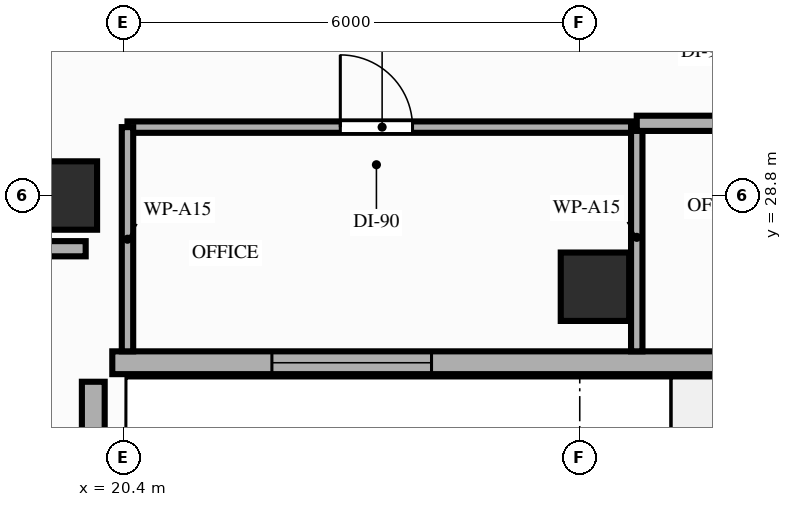
"""IFC4 building model, lengths in metres.
Left out: names, types, materials, properties, quantities, classifications, styles, units other than length and angle.
Written with IfcOpenShell. Run it as: python <this file> out.ifc"""

import sys

from ifc_helpers import new_model, si_unit, direction, frame, frame_2d, origin, origin_2d, place, context, subcontext, project, spatial, rectangle, extrude, element, fill, save


model = new_model("IFC4")
c1 = context("Model", 3, precision=1e-05, world=origin(), true_north=direction((0.0, 1.0)))
c2 = subcontext(c1, "Body", "Model", "MODEL_VIEW")
j1 = project(units=[si_unit("LENGTHUNIT", "METRE"), si_unit("PLANEANGLEUNIT", "RADIAN")], contexts=[c1])
p1 = place(None, origin())
s1 = spatial("IfcSite", under=j1, at=p1, CompositionType="ELEMENT")
p2 = place(p1, origin())
s2 = spatial("IfcBuilding", under=s1, at=p2, CompositionType="ELEMENT")
p3 = place(p2, frame((0.0, 0.0, 185.6)))
s3 = spatial("IfcBuildingStorey", under=s2, at=p3, CompositionType="ELEMENT", Elevation=185.6)
for number, where, z_axis, x_axis in (
    (1, (19.6, 28.8, 0.0), (0.0, 0.0, 1.0), (1.0, 0.0, 0.0)),
    (2, (26.6, 27.6, 0.0), (0.0, 0.0, 1.0), (1.0, 0.0, 0.0)),
):
    element("IfcColumn", number, at=place(p3, frame(where, z_axis=z_axis, x_axis=x_axis)), inside=s3, PredefinedType="COLUMN", context=c2, shape_type="SweptSolid", body=[
        extrude(rectangle(XDim=0.9, YDim=0.9, at=origin_2d()), origin(), (0.0, 0.0, 1.0), 3.2),
    ])
p4 = place(p3, frame((20.0, 8.8, 0.0), z_axis=(0.0, 0.0, 1.0), x_axis=(0.0, 1.0, 0.0)))
e3 = element("IfcWall", 3, at=p4, inside=s3, PredefinedType="STANDARD", context=c2, shape_type="SweptSolid", body=[
    extrude(rectangle(XDim=17.55, YDim=0.3, at=frame_2d((8.775, 0.0))), origin(), (0.0, 0.0, 1.0), 2.45),
])
p5 = place(p4, frame((1.84, 0.0, 0.85)))
e4 = element("IfcOpeningElement", 4, at=p5, cuts=e3, PredefinedType="OPENING", context=c2, shape_type="SweptSolid", body=[
    extrude(rectangle(XDim=1.1, YDim=1.35, at=frame_2d((0.55, 0.675))), frame((0.0, 0.16, 0.0), z_axis=(0.0, -1.0, 0.0), x_axis=(1.0, 0.0, 0.0)), (0.0, 0.0, 1.0), 0.32),
])
p6 = place(p4, frame((5.88, 0.0, 0.85)))
e5 = element("IfcOpeningElement", 5, at=p6, cuts=e3, PredefinedType="OPENING", context=c2, shape_type="SweptSolid", body=[
    extrude(rectangle(XDim=2.1, YDim=1.35, at=frame_2d((1.05, 0.675))), frame((0.0, 0.16, 0.0), z_axis=(0.0, -1.0, 0.0), x_axis=(1.0, 0.0, 0.0)), (0.0, 0.0, 1.0), 0.32),
])
p7 = place(p4, frame((10.85, 0.0, 0.85)))
e6 = element("IfcOpeningElement", 6, at=p7, cuts=e3, PredefinedType="OPENING", context=c2, shape_type="SweptSolid", body=[
    extrude(rectangle(XDim=2.1, YDim=1.35, at=frame_2d((1.05, 0.675))), frame((0.0, 0.16, 0.0), z_axis=(0.0, -1.0, 0.0), x_axis=(1.0, 0.0, 0.0)), (0.0, 0.0, 1.0), 0.32),
])
p8 = place(p3, frame((20.25, 26.6, 0.0), z_axis=(0.0, 0.0, 1.0), x_axis=(1.0, 0.0, 0.0)))
e7 = element("IfcWall", 7, at=p8, inside=s3, PredefinedType="STANDARD", context=c2, shape_type="SweptSolid", body=[
    extrude(rectangle(XDim=21.35, YDim=0.3, at=frame_2d((10.675, 0.0))), origin(), (0.0, 0.0, 1.0), 2.71),
])
p9 = place(p8, frame((7.95, 0.0, 0.0)))
e8 = element("IfcOpeningElement", 8, at=p9, cuts=e7, PredefinedType="OPENING", context=c2, shape_type="SweptSolid", body=[
    extrude(rectangle(XDim=1.4, YDim=2.1, at=frame_2d((0.7, 1.05))), frame((0.0, 0.16, 0.0), z_axis=(0.0, -1.0, 0.0), x_axis=(1.0, 0.0, 0.0)), (0.0, 0.0, 1.0), 0.32),
])
p10 = place(p8, frame((16.13, 0.0, 0.85)))
e9 = element("IfcOpeningElement", 9, at=p10, cuts=e7, PredefinedType="OPENING", context=c2, shape_type="SweptSolid", body=[
    extrude(rectangle(XDim=2.1, YDim=1.61, at=frame_2d((1.05, 0.805))), frame((0.0, 0.16, 0.0), z_axis=(0.0, -1.0, 0.0), x_axis=(1.0, 0.0, 0.0)), (0.0, 0.0, 1.0), 0.32),
])
p11 = place(p8, frame((2.1, 0.0, 0.85)))
e10 = element("IfcOpeningElement", 10, at=p11, cuts=e7, PredefinedType="OPENING", context=c2, shape_type="SweptSolid", body=[
    extrude(rectangle(XDim=2.1, YDim=1.61, at=frame_2d((1.05, 0.805))), frame((0.0, 0.16, 0.0), z_axis=(0.0, -1.0, 0.0), x_axis=(1.0, 0.0, 0.0)), (0.0, 0.0, 1.0), 0.32),
])
p12 = place(p8, frame((13.5, 0.0, 0.85)))
e11 = element("IfcOpeningElement", 11, at=p12, cuts=e7, PredefinedType="OPENING", context=c2, shape_type="SweptSolid", body=[
    extrude(rectangle(XDim=2.1, YDim=1.61, at=frame_2d((1.05, 0.805))), frame((0.0, 0.16, 0.0), z_axis=(0.0, -1.0, 0.0), x_axis=(1.0, 0.0, 0.0)), (0.0, 0.0, 1.0), 0.32),
])
p13 = place(p3, frame((12.91, 28.1, 0.0), z_axis=(0.0, 0.0, 1.0), x_axis=(1.0, 0.0, 0.0)))
e12 = element("IfcWall", 12, at=p13, inside=s3, PredefinedType="PARTITIONING", context=c2, shape_type="SweptSolid", body=[
    extrude(rectangle(XDim=6.99, YDim=0.2, at=frame_2d((3.495, 0.0))), origin(), (0.0, 0.0, 1.0), 2.45),
])
p14 = place(p3, frame((20.45, 29.7, 0.0), z_axis=(0.0, 0.0, 1.0), x_axis=(1.0, 0.0, 0.0)))
e13 = element("IfcWall", 13, at=p14, inside=s3, PredefinedType="PARTITIONING", context=c2, shape_type="SweptSolid", body=[
    extrude(rectangle(XDim=6.7, YDim=0.15, at=frame_2d((3.35, 0.0))), origin(), (0.0, 0.0, 1.0), 3.02),
])
p15 = place(p14, frame((2.8, 0.0, 0.0)))
e14 = element("IfcOpeningElement", 14, at=p15, cuts=e13, PredefinedType="OPENING", context=c2, shape_type="SweptSolid", body=[
    extrude(rectangle(XDim=0.95, YDim=2.15, at=frame_2d((0.475, 1.075))), frame((0.0, 0.085, 0.0), z_axis=(0.0, -1.0, 0.0), x_axis=(1.0, 0.0, 0.0)), (0.0, 0.0, 1.0), 0.17),
])
p16 = place(p3, frame((20.45, 26.75, 0.0), z_axis=(0.0, 0.0, 1.0), x_axis=(0.0, 1.0, 0.0)))
e15 = element("IfcWall", 15, at=p16, inside=s3, PredefinedType="PARTITIONING", context=c2, shape_type="SweptSolid", body=[
    extrude(rectangle(XDim=2.95, YDim=0.15, at=frame_2d((1.475, 0.0))), origin(), (0.0, 0.0, 1.0), 2.45),
])
p17 = place(p3, frame((27.15, 26.75, 0.0), z_axis=(0.0, 0.0, 1.0), x_axis=(0.0, 1.0, 0.0)))
e16 = element("IfcWall", 16, at=p17, inside=s3, PredefinedType="PARTITIONING", context=c2, shape_type="SweptSolid", body=[
    extrude(rectangle(XDim=3.0, YDim=0.15, at=frame_2d((1.5, 0.0))), origin(), (0.0, 0.0, 1.0), 2.45),
])
p18 = place(p3, frame((27.15, 29.75, 0.0), z_axis=(0.0, 0.0, 1.0), x_axis=(1.0, 0.0, 0.0)))
e17 = element("IfcWall", 17, at=p18, inside=s3, PredefinedType="PARTITIONING", context=c2, shape_type="SweptSolid", body=[
    extrude(rectangle(XDim=6.25, YDim=0.2, at=frame_2d((3.125, 0.0))), origin(), (0.0, 0.0, 1.0), 2.45),
])
p19 = place(p18, frame((2.65, 0.0, 0.0)))
e18 = element("IfcOpeningElement", 18, at=p19, cuts=e17, PredefinedType="OPENING", context=c2, shape_type="SweptSolid", body=[
    extrude(rectangle(XDim=0.95, YDim=2.15, at=frame_2d((0.475, 1.075))), frame((0.0, 0.11, 0.0), z_axis=(0.0, -1.0, 0.0), x_axis=(1.0, 0.0, 0.0)), (0.0, 0.0, 1.0), 0.22),
])
p20 = place(p11, origin())
e19 = element("IfcWindow", 19, at=p20, inside=s3, PartitioningType="SINGLE_PANEL", PredefinedType="WINDOW", context=c2, shape_type="SweptSolid", body=[
    extrude(rectangle(XDim=2.1, YDim=1.61, at=frame_2d((1.05, 0.805))), frame((0.0, 0.03, 0.0), z_axis=(0.0, -1.0, 0.0), x_axis=(1.0, 0.0, 0.0)), (0.0, 0.0, 1.0), 0.06),
])
fill(e10, e19)
p21 = place(p15, origin())
e20 = element("IfcDoor", 20, at=p21, inside=s3, OperationType="SINGLE_SWING_LEFT", PredefinedType="DOOR", context=c2, shape_type="SweptSolid", body=[
    extrude(rectangle(XDim=0.95, YDim=2.15, at=frame_2d((0.475, 1.075))), frame((0.0, 0.025, 0.0), z_axis=(0.0, -1.0, 0.0), x_axis=(1.0, 0.0, 0.0)), (0.0, 0.0, 1.0), 0.05),
])
fill(e14, e20)
save(model, sys.argv[1])
